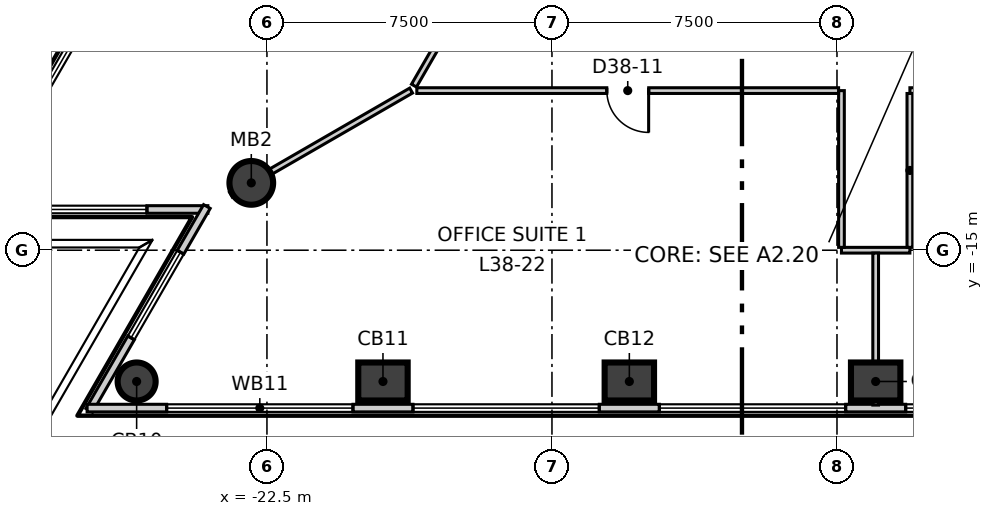
"""IFC4 building model, lengths in metres.
Left out: names, types, materials, properties, quantities, classifications, styles, units other than length and angle.
Written with IfcOpenShell. Run it as: python <this file> out.ifc"""

import sys

from ifc_helpers import new_model, si_unit, direction, frame, frame_2d, origin, origin_2d, place, context, subcontext, project, spatial, rectangle, circle, extrude, element, fill, save


model = new_model("IFC4")
c1 = context("Model", 3, precision=1e-05, world=origin(), true_north=direction((0.0, 1.0)))
c2 = subcontext(c1, "Body", "Model", "MODEL_VIEW")
j1 = project(units=[si_unit("LENGTHUNIT", "METRE"), si_unit("PLANEANGLEUNIT", "RADIAN")], contexts=[c1])
p1 = place(None, origin())
s1 = spatial("IfcSite", under=j1, at=p1, CompositionType="ELEMENT")
p2 = place(p1, origin())
s2 = spatial("IfcBuilding", under=s1, at=p2, CompositionType="ELEMENT")
p3 = place(p2, frame((0.0, 0.0, 164.3)))
s3 = spatial("IfcBuildingStorey", under=s2, at=p3, CompositionType="ELEMENT", Elevation=164.3)
p4 = place(p3, frame((-25.929, -18.454, -0.3), z_axis=(0.0, 0.0, 1.0), x_axis=(1.0, 0.0, 0.0)))
e1 = element("IfcColumn", 1, at=p4, inside=s3, PredefinedType="COLUMN", context=c2, shape_type="SweptSolid", body=[
    extrude(circle(Radius=0.5, at=origin_2d()), origin(), (0.0, 0.0, 1.0), 4.0),
])
for number, where, z_axis, x_axis in (
    (2, (-19.447, -18.454, -0.3), (0.0, 0.0, 1.0), (1.0, 0.0, 0.0)),
    (3, (-12.964, -18.454, -0.3), (0.0, 0.0, 1.0), (1.0, 0.0, 0.0)),
    (4, (-6.482, -18.454, -0.3), (0.0, 0.0, 1.0), (1.0, 0.0, 0.0)),
):
    element("IfcColumn", number, at=place(p3, frame(where, z_axis=z_axis, x_axis=x_axis)), inside=s3, PredefinedType="COLUMN", context=c2, shape_type="SweptSolid", body=[
        extrude(rectangle(XDim=1.3, YDim=1.0, at=origin_2d()), origin(), (0.0, 0.0, 1.0), 4.0),
    ])
p5 = place(p3, frame((-22.912, -13.228, -0.3), z_axis=(0.0, 0.0, 1.0), x_axis=(1.0, 0.0, 0.0)))
e5 = element("IfcColumn", 5, at=p5, inside=s3, PredefinedType="COLUMN", context=c2, shape_type="SweptSolid", body=[
    extrude(circle(Radius=0.575, at=origin_2d()), origin(), (0.0, 0.0, 1.0), 4.0),
])
p6 = place(p3, frame((-2.972, 33.16, 0.0), z_axis=(0.0, 0.0, 1.0), x_axis=(-0.500009959561, -0.866019653553, 0.0)))
e6 = element("IfcWall", 6, at=p6, inside=s3, PredefinedType="ELEMENTEDWALL", context=c2, shape_type="SweptSolid", body=[
    extrude(rectangle(XDim=54.443, YDim=0.2, at=frame_2d((27.222, 0.0))), origin(), (0.0, 0.0, 1.0), 3.7),
])
p7 = place(p6, frame((2.094, 0.0, 0.9)))
e7 = element("IfcOpeningElement", 7, at=p7, cuts=e6, PredefinedType="OPENING", context=c2, shape_type="SweptSolid", body=[
    extrude(rectangle(XDim=4.9, YDim=2.5, at=frame_2d((2.45, 1.25))), frame((0.0, 0.11, 0.0), z_axis=(0.0, -1.0, 0.0), x_axis=(1.0, 0.0, 0.0)), (0.0, 0.0, 1.0), 0.22),
])
p8 = place(p6, frame((8.576, 0.0, 0.9)))
e8 = element("IfcOpeningElement", 8, at=p8, cuts=e6, PredefinedType="OPENING", context=c2, shape_type="SweptSolid", body=[
    extrude(rectangle(XDim=4.9, YDim=2.5, at=frame_2d((2.45, 1.25))), frame((0.0, 0.11, 0.0), z_axis=(0.0, -1.0, 0.0), x_axis=(1.0, 0.0, 0.0)), (0.0, 0.0, 1.0), 0.22),
])
p9 = place(p6, frame((15.058, 0.0, 0.9)))
e9 = element("IfcOpeningElement", 9, at=p9, cuts=e6, PredefinedType="OPENING", context=c2, shape_type="SweptSolid", body=[
    extrude(rectangle(XDim=4.9, YDim=2.5, at=frame_2d((2.45, 1.25))), frame((0.0, 0.11, 0.0), z_axis=(0.0, -1.0, 0.0), x_axis=(1.0, 0.0, 0.0)), (0.0, 0.0, 1.0), 0.22),
])
p10 = place(p6, frame((21.54, 0.0, 0.9)))
e10 = element("IfcOpeningElement", 10, at=p10, cuts=e6, PredefinedType="OPENING", context=c2, shape_type="SweptSolid", body=[
    extrude(rectangle(XDim=4.9, YDim=2.5, at=frame_2d((2.45, 1.25))), frame((0.0, 0.11, 0.0), z_axis=(0.0, -1.0, 0.0), x_axis=(1.0, 0.0, 0.0)), (0.0, 0.0, 1.0), 0.22),
])
p11 = place(p6, frame((28.022, 0.0, 0.9)))
e11 = element("IfcOpeningElement", 11, at=p11, cuts=e6, PredefinedType="OPENING", context=c2, shape_type="SweptSolid", body=[
    extrude(rectangle(XDim=4.9, YDim=2.5, at=frame_2d((2.45, 1.25))), frame((0.0, 0.11, 0.0), z_axis=(0.0, -1.0, 0.0), x_axis=(1.0, 0.0, 0.0)), (0.0, 0.0, 1.0), 0.22),
])
p12 = place(p6, frame((34.505, 0.0, 0.9)))
e12 = element("IfcOpeningElement", 12, at=p12, cuts=e6, PredefinedType="OPENING", context=c2, shape_type="SweptSolid", body=[
    extrude(rectangle(XDim=4.9, YDim=2.5, at=frame_2d((2.45, 1.25))), frame((0.0, 0.11, 0.0), z_axis=(0.0, -1.0, 0.0), x_axis=(1.0, 0.0, 0.0)), (0.0, 0.0, 1.0), 0.22),
])
p13 = place(p6, frame((40.987, 0.0, 0.9)))
e13 = element("IfcOpeningElement", 13, at=p13, cuts=e6, PredefinedType="OPENING", context=c2, shape_type="SweptSolid", body=[
    extrude(rectangle(XDim=4.9, YDim=2.5, at=frame_2d((2.45, 1.25))), frame((0.0, 0.11, 0.0), z_axis=(0.0, -1.0, 0.0), x_axis=(1.0, 0.0, 0.0)), (0.0, 0.0, 1.0), 0.22),
])
p14 = place(p6, frame((47.469, 0.0, 0.9)))
e14 = element("IfcOpeningElement", 14, at=p14, cuts=e6, PredefinedType="OPENING", context=c2, shape_type="SweptSolid", body=[
    extrude(rectangle(XDim=4.9, YDim=2.5, at=frame_2d((2.45, 1.25))), frame((0.0, 0.11, 0.0), z_axis=(0.0, -1.0, 0.0), x_axis=(1.0, 0.0, 0.0)), (0.0, 0.0, 1.0), 0.22),
])
p15 = place(p3, frame((-30.249, -13.928, 0.0), z_axis=(0.0, 0.0, 1.0), x_axis=(1.0, 0.0, 0.0)))
e15 = element("IfcWall", 15, at=p15, inside=s3, PredefinedType="ELEMENTEDWALL", context=c2, shape_type="SweptSolid", body=[
    extrude(rectangle(XDim=6.194, YDim=0.2, at=frame_2d((3.097, 0.0))), origin(), (0.0, 0.0, 1.0), 3.7),
])
p16 = place(p15, frame((1.99, 0.0, 0.9)))
e16 = element("IfcOpeningElement", 16, at=p16, cuts=e15, PredefinedType="OPENING", context=c2, shape_type="SweptSolid", body=[
    extrude(rectangle(XDim=2.6, YDim=2.5, at=frame_2d((1.3, 1.25))), frame((0.0, 0.11, 0.0), z_axis=(0.0, -1.0, 0.0), x_axis=(1.0, 0.0, 0.0)), (0.0, 0.0, 1.0), 0.22),
])
p17 = place(p3, frame((-24.08, -13.85, 0.0), z_axis=(0.0, 0.0, 1.0), x_axis=(-0.499932836684, -0.86606417707, 0.0)))
e17 = element("IfcWall", 17, at=p17, inside=s3, PredefinedType="ELEMENTEDWALL", context=c2, shape_type="SweptSolid", body=[
    extrude(rectangle(XDim=6.195, YDim=0.2, at=frame_2d((3.097, 0.0))), origin(), (0.0, 0.0, 1.0), 3.7),
])
p18 = place(p17, frame((1.39, 0.0, 0.9)))
e18 = element("IfcOpeningElement", 18, at=p18, cuts=e17, PredefinedType="OPENING", context=c2, shape_type="SweptSolid", body=[
    extrude(rectangle(XDim=2.6, YDim=2.5, at=frame_2d((1.3, 1.25))), frame((0.0, 0.11, 0.0), z_axis=(0.0, -1.0, 0.0), x_axis=(1.0, 0.0, 0.0)), (0.0, 0.0, 1.0), 0.22),
])
p19 = place(p3, frame((-27.232, -19.154, 0.0), z_axis=(0.0, 0.0, 1.0), x_axis=(1.0, 0.0, 0.0)))
e19 = element("IfcWall", 19, at=p19, inside=s3, PredefinedType="ELEMENTEDWALL", context=c2, shape_type="SweptSolid", body=[
    extrude(rectangle(XDim=54.444, YDim=0.2, at=frame_2d((27.222, 0.0))), origin(), (0.0, 0.0, 1.0), 3.7),
])
p20 = place(p19, frame((2.094, 0.0, 0.9)))
e20 = element("IfcOpeningElement", 20, at=p20, cuts=e19, PredefinedType="OPENING", context=c2, shape_type="SweptSolid", body=[
    extrude(rectangle(XDim=4.9, YDim=2.5, at=frame_2d((2.45, 1.25))), frame((0.0, 0.11, 0.0), z_axis=(0.0, -1.0, 0.0), x_axis=(1.0, 0.0, 0.0)), (0.0, 0.0, 1.0), 0.22),
])
p21 = place(p19, frame((8.576, 0.0, 0.9)))
e21 = element("IfcOpeningElement", 21, at=p21, cuts=e19, PredefinedType="OPENING", context=c2, shape_type="SweptSolid", body=[
    extrude(rectangle(XDim=4.9, YDim=2.5, at=frame_2d((2.45, 1.25))), frame((0.0, 0.11, 0.0), z_axis=(0.0, -1.0, 0.0), x_axis=(1.0, 0.0, 0.0)), (0.0, 0.0, 1.0), 0.22),
])
p22 = place(p19, frame((15.059, 0.0, 0.9)))
e22 = element("IfcOpeningElement", 22, at=p22, cuts=e19, PredefinedType="OPENING", context=c2, shape_type="SweptSolid", body=[
    extrude(rectangle(XDim=4.9, YDim=2.5, at=frame_2d((2.45, 1.25))), frame((0.0, 0.11, 0.0), z_axis=(0.0, -1.0, 0.0), x_axis=(1.0, 0.0, 0.0)), (0.0, 0.0, 1.0), 0.22),
])
p23 = place(p19, frame((21.541, 0.0, 0.9)))
e23 = element("IfcOpeningElement", 23, at=p23, cuts=e19, PredefinedType="OPENING", context=c2, shape_type="SweptSolid", body=[
    extrude(rectangle(XDim=4.9, YDim=2.5, at=frame_2d((2.45, 1.25))), frame((0.0, 0.11, 0.0), z_axis=(0.0, -1.0, 0.0), x_axis=(1.0, 0.0, 0.0)), (0.0, 0.0, 1.0), 0.22),
])
p24 = place(p19, frame((28.023, 0.0, 0.9)))
e24 = element("IfcOpeningElement", 24, at=p24, cuts=e19, PredefinedType="OPENING", context=c2, shape_type="SweptSolid", body=[
    extrude(rectangle(XDim=4.9, YDim=2.5, at=frame_2d((2.45, 1.25))), frame((0.0, 0.11, 0.0), z_axis=(0.0, -1.0, 0.0), x_axis=(1.0, 0.0, 0.0)), (0.0, 0.0, 1.0), 0.22),
])
p25 = place(p19, frame((34.505, 0.0, 0.9)))
e25 = element("IfcOpeningElement", 25, at=p25, cuts=e19, PredefinedType="OPENING", context=c2, shape_type="SweptSolid", body=[
    extrude(rectangle(XDim=4.9, YDim=2.5, at=frame_2d((2.45, 1.25))), frame((0.0, 0.11, 0.0), z_axis=(0.0, -1.0, 0.0), x_axis=(1.0, 0.0, 0.0)), (0.0, 0.0, 1.0), 0.22),
])
p26 = place(p19, frame((40.988, 0.0, 0.9)))
e26 = element("IfcOpeningElement", 26, at=p26, cuts=e19, PredefinedType="OPENING", context=c2, shape_type="SweptSolid", body=[
    extrude(rectangle(XDim=4.9, YDim=2.5, at=frame_2d((2.45, 1.25))), frame((0.0, 0.11, 0.0), z_axis=(0.0, -1.0, 0.0), x_axis=(1.0, 0.0, 0.0)), (0.0, 0.0, 1.0), 0.22),
])
p27 = place(p19, frame((47.47, 0.0, 0.9)))
e27 = element("IfcOpeningElement", 27, at=p27, cuts=e19, PredefinedType="OPENING", context=c2, shape_type="SweptSolid", body=[
    extrude(rectangle(XDim=4.9, YDim=2.5, at=frame_2d((2.45, 1.25))), frame((0.0, 0.11, 0.0), z_axis=(0.0, -1.0, 0.0), x_axis=(1.0, 0.0, 0.0)), (0.0, 0.0, 1.0), 0.22),
])
p28 = place(p3, frame((-23.449, -13.538, 0.0), z_axis=(0.0, 0.0, 1.0), x_axis=(0.865971038555, 0.500094151519, 0.0)))
e28 = element("IfcWall", 28, at=p28, inside=s3, PredefinedType="PARTITIONING", context=c2, shape_type="SweptSolid", body=[
    extrude(rectangle(XDim=5.477, YDim=0.15, at=frame_2d((2.739, 0.0))), origin(), (0.0, 0.0, 1.0), 3.2),
])
p29 = place(p3, frame((-7.382, -15.0, 0.0), z_axis=(0.0, 0.0, 1.0), x_axis=(1.0, 0.0, 0.0)))
e29 = element("IfcWall", 29, at=p29, inside=s3, PredefinedType="PARTITIONING", context=c2, shape_type="SweptSolid", body=[
    extrude(rectangle(XDim=1.8, YDim=0.15, at=frame_2d((0.9, 0.0))), origin(), (0.0, 0.0, 1.0), 3.7),
])
p30 = place(p3, frame((-7.382, -14.925, 0.0), z_axis=(0.0, 0.0, 1.0), x_axis=(0.0, 1.0, 0.0)))
e30 = element("IfcWall", 30, at=p30, inside=s3, PredefinedType="PARTITIONING", context=c2, shape_type="SweptSolid", body=[
    extrude(rectangle(XDim=4.124, YDim=0.15, at=frame_2d((2.062, 0.0))), origin(), (0.0, 0.0, 1.0), 3.7),
])
p31 = place(p3, frame((-18.556, -10.8, 0.0), z_axis=(0.0, 0.0, 1.0), x_axis=(1.0, 0.0, 0.0)))
e31 = element("IfcWall", 31, at=p31, inside=s3, PredefinedType="PARTITIONING", context=c2, shape_type="SweptSolid", body=[
    extrude(rectangle(XDim=11.098, YDim=0.15, at=frame_2d((5.549, 0.0))), origin(), (0.0, 0.0, 1.0), 3.7),
])
p32 = place(p31, frame((5.0, 0.0, 0.0)))
e32 = element("IfcOpeningElement", 32, at=p32, cuts=e31, PredefinedType="OPENING", context=c2, shape_type="SweptSolid", body=[
    extrude(rectangle(XDim=1.1, YDim=2.1, at=frame_2d((0.55, 1.05))), frame((0.0, 0.085, 0.0), z_axis=(0.0, -1.0, 0.0), x_axis=(1.0, 0.0, 0.0)), (0.0, 0.0, 1.0), 0.17),
])
p33 = place(p3, frame((-5.581, -10.8, 0.0), z_axis=(0.0, 0.0, 1.0), x_axis=(1.0, 0.0, 0.0)))
e33 = element("IfcWall", 33, at=p33, inside=s3, PredefinedType="PARTITIONING", context=c2, shape_type="SweptSolid", body=[
    extrude(rectangle(XDim=24.287, YDim=0.15, at=frame_2d((12.144, 0.0))), origin(), (0.0, 0.0, 1.0), 3.7),
])
p34 = place(p33, frame((5.549, 0.0, 0.0)))
e34 = element("IfcOpeningElement", 34, at=p34, cuts=e33, PredefinedType="OPENING", context=c2, shape_type="SweptSolid", body=[
    extrude(rectangle(XDim=1.0, YDim=2.1, at=frame_2d((0.5, 1.05))), frame((0.0, 0.085, 0.0), z_axis=(0.0, -1.0, 0.0), x_axis=(1.0, 0.0, 0.0)), (0.0, 0.0, 1.0), 0.17),
])
p35 = place(p33, frame((14.813, 0.0, 0.0)))
e35 = element("IfcOpeningElement", 35, at=p35, cuts=e33, PredefinedType="OPENING", context=c2, shape_type="SweptSolid", body=[
    extrude(rectangle(XDim=1.0, YDim=2.1, at=frame_2d((0.5, 1.05))), frame((0.0, 0.085, 0.0), z_axis=(0.0, -1.0, 0.0), x_axis=(1.0, 0.0, 0.0)), (0.0, 0.0, 1.0), 0.17),
])
p36 = place(p33, frame((20.895, 0.0, 0.0)))
e36 = element("IfcOpeningElement", 36, at=p36, cuts=e33, PredefinedType="OPENING", context=c2, shape_type="SweptSolid", body=[
    extrude(rectangle(XDim=1.1, YDim=2.1, at=frame_2d((0.55, 1.05))), frame((0.0, 0.085, 0.0), z_axis=(0.0, -1.0, 0.0), x_axis=(1.0, 0.0, 0.0)), (0.0, 0.0, 1.0), 0.17),
])
p37 = place(p3, frame((-18.631, -10.669, 0.0), z_axis=(0.0, 0.0, 1.0), x_axis=(0.500000173646, 0.86602530353, 0.0)))
e37 = element("IfcWall", 37, at=p37, inside=s3, PredefinedType="PARTITIONING", context=c2, shape_type="SweptSolid", body=[
    extrude(rectangle(XDim=17.654, YDim=0.15, at=frame_2d((8.827, 0.0))), origin(), (0.0, 0.0, 1.0), 3.7),
])
p38 = place(p37, frame((9.705, 0.0, 0.0)))
e38 = element("IfcOpeningElement", 38, at=p38, cuts=e37, PredefinedType="OPENING", context=c2, shape_type="SweptSolid", body=[
    extrude(rectangle(XDim=1.0, YDim=2.1, at=frame_2d((0.5, 1.05))), frame((0.0, 0.085, 0.0), z_axis=(0.0, -1.0, 0.0), x_axis=(1.0, 0.0, 0.0)), (0.0, 0.0, 1.0), 0.17),
])
p39 = place(p37, frame((2.141, 0.0, 0.0)))
e39 = element("IfcOpeningElement", 39, at=p39, cuts=e37, PredefinedType="OPENING", context=c2, shape_type="SweptSolid", body=[
    extrude(rectangle(XDim=1.1, YDim=2.1, at=frame_2d((0.55, 1.05))), frame((0.0, 0.085, 0.0), z_axis=(0.0, -1.0, 0.0), x_axis=(1.0, 0.0, 0.0)), (0.0, 0.0, 1.0), 0.17),
])
p40 = place(p3, frame((-6.482, -19.074, 0.0), z_axis=(0.0, 0.0, 1.0), x_axis=(0.0, 1.0, 0.0)))
e40 = element("IfcWall", 40, at=p40, inside=s3, PredefinedType="PARTITIONING", context=c2, shape_type="SweptSolid", body=[
    extrude(rectangle(XDim=3.999, YDim=0.15, at=frame_2d((2.0, 0.0))), origin(), (0.0, 0.0, 1.0), 3.7),
])
p41 = place(p3, frame((-5.582, -14.925, 0.0), z_axis=(0.0, 0.0, 1.0), x_axis=(0.0, 1.0, 0.0)))
e41 = element("IfcWall", 41, at=p41, inside=s3, PredefinedType="PARTITIONING", context=c2, shape_type="SweptSolid", body=[
    extrude(rectangle(XDim=4.049, YDim=0.15, at=frame_2d((2.024, 0.0))), origin(), (0.0, 0.0, 1.0), 3.7),
])
p42 = place(p14, origin())
e42 = element("IfcWindow", 42, at=p42, inside=s3, PartitioningType="SINGLE_PANEL", PredefinedType="WINDOW", context=c2, shape_type="SweptSolid", body=[
    extrude(rectangle(XDim=4.9, YDim=2.5, at=frame_2d((2.45, 1.25))), frame((0.0, 0.03, 0.0), z_axis=(0.0, -1.0, 0.0), x_axis=(1.0, 0.0, 0.0)), (0.0, 0.0, 1.0), 0.06),
])
fill(e14, e42)
p43 = place(p16, origin())
e43 = element("IfcWindow", 43, at=p43, inside=s3, PartitioningType="SINGLE_PANEL", PredefinedType="WINDOW", context=c2, shape_type="SweptSolid", body=[
    extrude(rectangle(XDim=2.6, YDim=2.5, at=frame_2d((1.3, 1.25))), frame((0.0, 0.03, 0.0), z_axis=(0.0, -1.0, 0.0), x_axis=(1.0, 0.0, 0.0)), (0.0, 0.0, 1.0), 0.06),
])
fill(e16, e43)
p44 = place(p18, origin())
e44 = element("IfcWindow", 44, at=p44, inside=s3, PartitioningType="SINGLE_PANEL", PredefinedType="WINDOW", context=c2, shape_type="SweptSolid", body=[
    extrude(rectangle(XDim=2.6, YDim=2.5, at=frame_2d((1.3, 1.25))), frame((0.0, 0.03, 0.0), z_axis=(0.0, -1.0, 0.0), x_axis=(1.0, 0.0, 0.0)), (0.0, 0.0, 1.0), 0.06),
])
fill(e18, e44)
p45 = place(p20, origin())
e45 = element("IfcWindow", 45, at=p45, inside=s3, PartitioningType="SINGLE_PANEL", PredefinedType="WINDOW", context=c2, shape_type="SweptSolid", body=[
    extrude(rectangle(XDim=4.9, YDim=2.5, at=frame_2d((2.45, 1.25))), frame((0.0, 0.03, 0.0), z_axis=(0.0, -1.0, 0.0), x_axis=(1.0, 0.0, 0.0)), (0.0, 0.0, 1.0), 0.06),
])
fill(e20, e45)
p46 = place(p21, origin())
e46 = element("IfcWindow", 46, at=p46, inside=s3, PartitioningType="SINGLE_PANEL", PredefinedType="WINDOW", context=c2, shape_type="SweptSolid", body=[
    extrude(rectangle(XDim=4.9, YDim=2.5, at=frame_2d((2.45, 1.25))), frame((0.0, 0.03, 0.0), z_axis=(0.0, -1.0, 0.0), x_axis=(1.0, 0.0, 0.0)), (0.0, 0.0, 1.0), 0.06),
])
fill(e21, e46)
p47 = place(p22, origin())
e47 = element("IfcWindow", 47, at=p47, inside=s3, PartitioningType="SINGLE_PANEL", PredefinedType="WINDOW", context=c2, shape_type="SweptSolid", body=[
    extrude(rectangle(XDim=4.9, YDim=2.5, at=frame_2d((2.45, 1.25))), frame((0.0, 0.03, 0.0), z_axis=(0.0, -1.0, 0.0), x_axis=(1.0, 0.0, 0.0)), (0.0, 0.0, 1.0), 0.06),
])
fill(e22, e47)
p48 = place(p23, origin())
e48 = element("IfcWindow", 48, at=p48, inside=s3, PartitioningType="SINGLE_PANEL", PredefinedType="WINDOW", context=c2, shape_type="SweptSolid", body=[
    extrude(rectangle(XDim=4.9, YDim=2.5, at=frame_2d((2.45, 1.25))), frame((0.0, 0.03, 0.0), z_axis=(0.0, -1.0, 0.0), x_axis=(1.0, 0.0, 0.0)), (0.0, 0.0, 1.0), 0.06),
])
fill(e23, e48)
p49 = place(p32, origin())
e49 = element("IfcDoor", 49, at=p49, inside=s3, OperationType="SINGLE_SWING_RIGHT", PredefinedType="DOOR", context=c2, shape_type="SweptSolid", body=[
    extrude(rectangle(XDim=1.1, YDim=2.1, at=frame_2d((0.55, 1.05))), frame((0.0, 0.025, 0.0), z_axis=(0.0, -1.0, 0.0), x_axis=(1.0, 0.0, 0.0)), (0.0, 0.0, 1.0), 0.05),
])
fill(e32, e49)
save(model, sys.argv[1])
